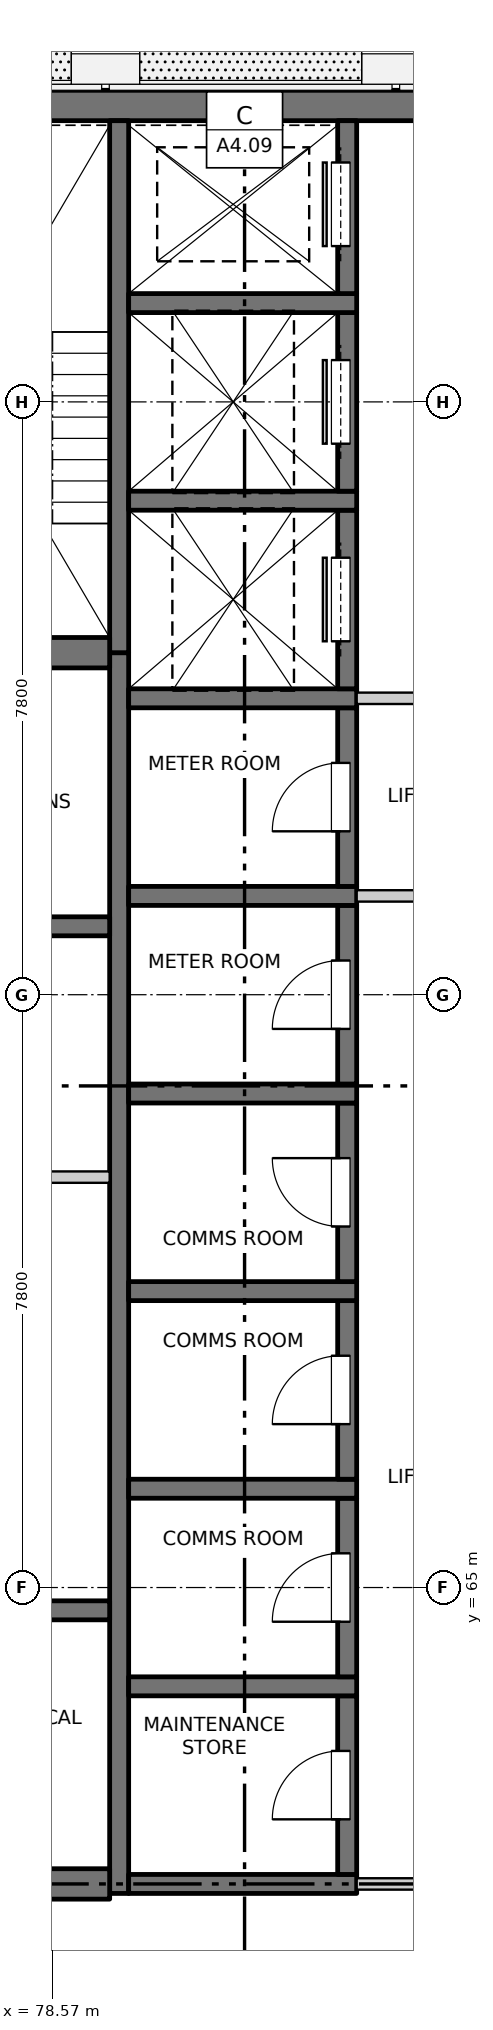
"""IFC4 building model, lengths in metres.
Left out: names, types, materials, properties, quantities, classifications, styles, units other than length and angle.
Written with IfcOpenShell. Run it as: python <this file> out.ifc"""

import sys

from ifc_helpers import new_model, si_unit, direction, frame, frame_2d, origin, place, context, subcontext, project, spatial, rectangle, extrude, element, fill, save


model = new_model("IFC4")
c1 = context("Model", 3, precision=1e-05, world=origin(), true_north=direction((0.0, 1.0)))
c2 = subcontext(c1, "Body", "Model", "MODEL_VIEW")
j1 = project(units=[si_unit("LENGTHUNIT", "METRE"), si_unit("PLANEANGLEUNIT", "RADIAN")], contexts=[c1])
p1 = place(None, origin())
s1 = spatial("IfcSite", under=j1, at=p1, CompositionType="ELEMENT")
p2 = place(p1, origin())
s2 = spatial("IfcBuilding", under=s1, at=p2, CompositionType="ELEMENT")
p3 = place(p2, frame((0.0, 0.0, 249.4)))
s3 = spatial("IfcBuildingStorey", under=s2, at=p3, CompositionType="ELEMENT", Elevation=249.4)
p4 = place(p3, frame((75.45, 84.5, -0.25), z_axis=(0.0, 0.0, 1.0), x_axis=(1.0, 0.0, 0.0)))
e1 = element("IfcWall", 1, at=p4, inside=s3, PredefinedType="SOLIDWALL", context=c2, shape_type="SweptSolid", body=[
    extrude(rectangle(XDim=19.1, YDim=0.4, at=frame_2d((9.55, 0.0))), origin(), (0.0, 0.0, 1.0), 3.4),
])
p5 = place(p3, frame((79.45, 60.975, -0.25), z_axis=(0.0, 0.0, 1.0), x_axis=(0.0, 1.0, 0.0)))
e2 = element("IfcWall", 2, at=p5, inside=s3, PredefinedType="SOLIDWALL", context=c2, shape_type="SweptSolid", body=[
    extrude(rectangle(XDim=16.325, YDim=0.25, at=frame_2d((8.163, 0.0))), origin(), (0.0, 0.0, 1.0), 3.4),
])
p6 = place(p3, frame((79.45, 77.3, -0.25), z_axis=(0.0, 0.0, 1.0), x_axis=(0.0, 1.0, 0.0)))
e3 = element("IfcWall", 3, at=p6, inside=s3, PredefinedType="SOLIDWALL", context=c2, shape_type="SweptSolid", body=[
    extrude(rectangle(XDim=7.0, YDim=0.25, at=frame_2d((3.5, 0.0))), origin(), (0.0, 0.0, 1.0), 3.4),
])
p7 = place(p3, frame((79.575, 61.1, -0.25), z_axis=(0.0, 0.0, 1.0), x_axis=(1.0, 0.0, 0.0)))
e4 = element("IfcWall", 4, at=p7, inside=s3, PredefinedType="SOLIDWALL", context=c2, shape_type="SweptSolid", body=[
    extrude(rectangle(XDim=3.0, YDim=0.25, at=frame_2d((1.5, 0.0))), origin(), (0.0, 0.0, 1.0), 3.4),
])
p8 = place(p3, frame((82.45, 61.225, -0.25), z_axis=(0.0, 0.0, 1.0), x_axis=(0.0, 1.0, 0.0)))
e5 = element("IfcWall", 5, at=p8, inside=s3, PredefinedType="SOLIDWALL", context=c2, shape_type="SweptSolid", body=[
    extrude(rectangle(XDim=2.35, YDim=0.25, at=frame_2d((1.175, 0.0))), origin(), (0.0, 0.0, 1.0), 3.4),
])
p9 = place(p8, frame((0.725, 0.0, 0.25)))
e6 = element("IfcOpeningElement", 6, at=p9, cuts=e5, PredefinedType="OPENING", context=c2, shape_type="SweptSolid", body=[
    extrude(rectangle(XDim=0.9, YDim=2.1, at=frame_2d((0.45, 1.05))), frame((0.0, 0.135, 0.0), z_axis=(0.0, -1.0, 0.0), x_axis=(1.0, 0.0, 0.0)), (0.0, 0.0, 1.0), 0.27),
])
p10 = place(p3, frame((79.575, 63.7, -0.25), z_axis=(0.0, 0.0, 1.0), x_axis=(1.0, 0.0, 0.0)))
e7 = element("IfcWall", 7, at=p10, inside=s3, PredefinedType="SOLIDWALL", context=c2, shape_type="SweptSolid", body=[
    extrude(rectangle(XDim=3.0, YDim=0.25, at=frame_2d((1.5, 0.0))), origin(), (0.0, 0.0, 1.0), 3.4),
])
p11 = place(p3, frame((82.45, 63.825, -0.25), z_axis=(0.0, 0.0, 1.0), x_axis=(0.0, 1.0, 0.0)))
e8 = element("IfcWall", 8, at=p11, inside=s3, PredefinedType="SOLIDWALL", context=c2, shape_type="SweptSolid", body=[
    extrude(rectangle(XDim=2.35, YDim=0.25, at=frame_2d((1.175, 0.0))), origin(), (0.0, 0.0, 1.0), 3.4),
])
p12 = place(p11, frame((0.725, 0.0, 0.25)))
e9 = element("IfcOpeningElement", 9, at=p12, cuts=e8, PredefinedType="OPENING", context=c2, shape_type="SweptSolid", body=[
    extrude(rectangle(XDim=0.9, YDim=2.1, at=frame_2d((0.45, 1.05))), frame((0.0, 0.135, 0.0), z_axis=(0.0, -1.0, 0.0), x_axis=(1.0, 0.0, 0.0)), (0.0, 0.0, 1.0), 0.27),
])
p13 = place(p3, frame((79.575, 66.3, -0.25), z_axis=(0.0, 0.0, 1.0), x_axis=(1.0, 0.0, 0.0)))
e10 = element("IfcWall", 10, at=p13, inside=s3, PredefinedType="SOLIDWALL", context=c2, shape_type="SweptSolid", body=[
    extrude(rectangle(XDim=3.0, YDim=0.25, at=frame_2d((1.5, 0.0))), origin(), (0.0, 0.0, 1.0), 3.4),
])
p14 = place(p3, frame((82.45, 66.425, -0.25), z_axis=(0.0, 0.0, 1.0), x_axis=(0.0, 1.0, 0.0)))
e11 = element("IfcWall", 11, at=p14, inside=s3, PredefinedType="SOLIDWALL", context=c2, shape_type="SweptSolid", body=[
    extrude(rectangle(XDim=2.35, YDim=0.25, at=frame_2d((1.175, 0.0))), origin(), (0.0, 0.0, 1.0), 3.4),
])
p15 = place(p14, frame((0.725, 0.0, 0.25)))
e12 = element("IfcOpeningElement", 12, at=p15, cuts=e11, PredefinedType="OPENING", context=c2, shape_type="SweptSolid", body=[
    extrude(rectangle(XDim=0.9, YDim=2.1, at=frame_2d((0.45, 1.05))), frame((0.0, 0.135, 0.0), z_axis=(0.0, -1.0, 0.0), x_axis=(1.0, 0.0, 0.0)), (0.0, 0.0, 1.0), 0.27),
])
p16 = place(p3, frame((79.575, 68.9, -0.25), z_axis=(0.0, 0.0, 1.0), x_axis=(1.0, 0.0, 0.0)))
e13 = element("IfcWall", 13, at=p16, inside=s3, PredefinedType="SOLIDWALL", context=c2, shape_type="SweptSolid", body=[
    extrude(rectangle(XDim=3.0, YDim=0.25, at=frame_2d((1.5, 0.0))), origin(), (0.0, 0.0, 1.0), 3.4),
])
p17 = place(p3, frame((82.45, 69.025, -0.25), z_axis=(0.0, 0.0, 1.0), x_axis=(0.0, 1.0, 0.0)))
e14 = element("IfcWall", 14, at=p17, inside=s3, PredefinedType="SOLIDWALL", context=c2, shape_type="SweptSolid", body=[
    extrude(rectangle(XDim=2.35, YDim=0.25, at=frame_2d((1.175, 0.0))), origin(), (0.0, 0.0, 1.0), 3.4),
])
p18 = place(p17, frame((0.725, 0.0, 0.25)))
e15 = element("IfcOpeningElement", 15, at=p18, cuts=e14, PredefinedType="OPENING", context=c2, shape_type="SweptSolid", body=[
    extrude(rectangle(XDim=0.9, YDim=2.1, at=frame_2d((0.45, 1.05))), frame((0.0, 0.135, 0.0), z_axis=(0.0, -1.0, 0.0), x_axis=(1.0, 0.0, 0.0)), (0.0, 0.0, 1.0), 0.27),
])
p19 = place(p3, frame((79.575, 71.5, -0.25), z_axis=(0.0, 0.0, 1.0), x_axis=(1.0, 0.0, 0.0)))
e16 = element("IfcWall", 16, at=p19, inside=s3, PredefinedType="SOLIDWALL", context=c2, shape_type="SweptSolid", body=[
    extrude(rectangle(XDim=3.0, YDim=0.25, at=frame_2d((1.5, 0.0))), origin(), (0.0, 0.0, 1.0), 3.4),
])
p20 = place(p3, frame((82.45, 71.625, -0.25), z_axis=(0.0, 0.0, 1.0), x_axis=(0.0, 1.0, 0.0)))
e17 = element("IfcWall", 17, at=p20, inside=s3, PredefinedType="SOLIDWALL", context=c2, shape_type="SweptSolid", body=[
    extrude(rectangle(XDim=2.35, YDim=0.25, at=frame_2d((1.175, 0.0))), origin(), (0.0, 0.0, 1.0), 3.4),
])
p21 = place(p20, frame((0.725, 0.0, 0.25)))
e18 = element("IfcOpeningElement", 18, at=p21, cuts=e17, PredefinedType="OPENING", context=c2, shape_type="SweptSolid", body=[
    extrude(rectangle(XDim=0.9, YDim=2.1, at=frame_2d((0.45, 1.05))), frame((0.0, 0.135, 0.0), z_axis=(0.0, -1.0, 0.0), x_axis=(1.0, 0.0, 0.0)), (0.0, 0.0, 1.0), 0.27),
])
p22 = place(p3, frame((79.575, 74.1, -0.25), z_axis=(0.0, 0.0, 1.0), x_axis=(1.0, 0.0, 0.0)))
e19 = element("IfcWall", 19, at=p22, inside=s3, PredefinedType="SOLIDWALL", context=c2, shape_type="SweptSolid", body=[
    extrude(rectangle(XDim=3.0, YDim=0.25, at=frame_2d((1.5, 0.0))), origin(), (0.0, 0.0, 1.0), 3.4),
])
p23 = place(p3, frame((82.45, 74.225, -0.25), z_axis=(0.0, 0.0, 1.0), x_axis=(0.0, 1.0, 0.0)))
e20 = element("IfcWall", 20, at=p23, inside=s3, PredefinedType="SOLIDWALL", context=c2, shape_type="SweptSolid", body=[
    extrude(rectangle(XDim=2.35, YDim=0.25, at=frame_2d((1.175, 0.0))), origin(), (0.0, 0.0, 1.0), 3.4),
])
p24 = place(p23, frame((0.725, 0.0, 0.25)))
e21 = element("IfcOpeningElement", 21, at=p24, cuts=e20, PredefinedType="OPENING", context=c2, shape_type="SweptSolid", body=[
    extrude(rectangle(XDim=0.9, YDim=2.1, at=frame_2d((0.45, 1.05))), frame((0.0, 0.135, 0.0), z_axis=(0.0, -1.0, 0.0), x_axis=(1.0, 0.0, 0.0)), (0.0, 0.0, 1.0), 0.27),
])
p25 = place(p3, frame((79.575, 76.7, -0.25), z_axis=(0.0, 0.0, 1.0), x_axis=(1.0, 0.0, 0.0)))
e22 = element("IfcWall", 22, at=p25, inside=s3, PredefinedType="SOLIDWALL", context=c2, shape_type="SweptSolid", body=[
    extrude(rectangle(XDim=3.0, YDim=0.25, at=frame_2d((1.5, 0.0))), origin(), (0.0, 0.0, 1.0), 3.4),
])
p26 = place(p3, frame((82.45, 76.825, -0.25), z_axis=(0.0, 0.0, 1.0), x_axis=(0.0, 1.0, 0.0)))
e23 = element("IfcWall", 23, at=p26, inside=s3, PredefinedType="SOLIDWALL", context=c2, shape_type="SweptSolid", body=[
    extrude(rectangle(XDim=2.35, YDim=0.25, at=frame_2d((1.175, 0.0))), origin(), (0.0, 0.0, 1.0), 3.4),
])
p27 = place(p26, frame((0.625, 0.0, 0.25)))
e24 = element("IfcOpeningElement", 24, at=p27, cuts=e23, PredefinedType="OPENING", context=c2, shape_type="SweptSolid", body=[
    extrude(rectangle(XDim=1.1, YDim=2.1, at=frame_2d((0.55, 1.05))), frame((0.0, 0.135, 0.0), z_axis=(0.0, -1.0, 0.0), x_axis=(1.0, 0.0, 0.0)), (0.0, 0.0, 1.0), 0.27),
])
p28 = place(p3, frame((79.575, 79.3, -0.25), z_axis=(0.0, 0.0, 1.0), x_axis=(1.0, 0.0, 0.0)))
e25 = element("IfcWall", 25, at=p28, inside=s3, PredefinedType="SOLIDWALL", context=c2, shape_type="SweptSolid", body=[
    extrude(rectangle(XDim=3.0, YDim=0.25, at=frame_2d((1.5, 0.0))), origin(), (0.0, 0.0, 1.0), 3.4),
])
p29 = place(p3, frame((82.45, 79.425, -0.25), z_axis=(0.0, 0.0, 1.0), x_axis=(0.0, 1.0, 0.0)))
e26 = element("IfcWall", 26, at=p29, inside=s3, PredefinedType="SOLIDWALL", context=c2, shape_type="SweptSolid", body=[
    extrude(rectangle(XDim=2.35, YDim=0.25, at=frame_2d((1.175, 0.0))), origin(), (0.0, 0.0, 1.0), 3.4),
])
p30 = place(p29, frame((0.625, 0.0, 0.25)))
e27 = element("IfcOpeningElement", 27, at=p30, cuts=e26, PredefinedType="OPENING", context=c2, shape_type="SweptSolid", body=[
    extrude(rectangle(XDim=1.1, YDim=2.1, at=frame_2d((0.55, 1.05))), frame((0.0, 0.135, 0.0), z_axis=(0.0, -1.0, 0.0), x_axis=(1.0, 0.0, 0.0)), (0.0, 0.0, 1.0), 0.27),
])
p31 = place(p3, frame((79.575, 81.9, -0.25), z_axis=(0.0, 0.0, 1.0), x_axis=(1.0, 0.0, 0.0)))
e28 = element("IfcWall", 28, at=p31, inside=s3, PredefinedType="SOLIDWALL", context=c2, shape_type="SweptSolid", body=[
    extrude(rectangle(XDim=3.0, YDim=0.25, at=frame_2d((1.5, 0.0))), origin(), (0.0, 0.0, 1.0), 3.4),
])
p32 = place(p3, frame((82.45, 82.025, -0.25), z_axis=(0.0, 0.0, 1.0), x_axis=(0.0, 1.0, 0.0)))
e29 = element("IfcWall", 29, at=p32, inside=s3, PredefinedType="SOLIDWALL", context=c2, shape_type="SweptSolid", body=[
    extrude(rectangle(XDim=2.275, YDim=0.25, at=frame_2d((1.138, 0.0))), origin(), (0.0, 0.0, 1.0), 3.4),
])
p33 = place(p32, frame((0.625, 0.0, 0.25)))
e30 = element("IfcOpeningElement", 30, at=p33, cuts=e29, PredefinedType="OPENING", context=c2, shape_type="SweptSolid", body=[
    extrude(rectangle(XDim=1.1, YDim=2.1, at=frame_2d((0.55, 1.05))), frame((0.0, 0.135, 0.0), z_axis=(0.0, -1.0, 0.0), x_axis=(1.0, 0.0, 0.0)), (0.0, 0.0, 1.0), 0.27),
])
p34 = place(p3, frame((75.45, 61.1, -0.25), z_axis=(0.0, 0.0, 1.0), x_axis=(1.0, 0.0, 0.0)))
e31 = element("IfcWall", 31, at=p34, inside=s3, PredefinedType="SOLIDWALL", context=c2, shape_type="SweptSolid", body=[
    extrude(rectangle(XDim=3.875, YDim=0.4, at=frame_2d((1.938, 0.0))), origin(), (0.0, 0.0, 1.0), 3.4),
])
for number, where, z_axis, x_axis in (
    (32, (75.45, 64.7, -0.25), (0.0, 0.0, 1.0), (1.0, 0.0, 0.0)),
    (33, (75.45, 73.7, -0.25), (0.0, 0.0, 1.0), (1.0, 0.0, 0.0)),
):
    element("IfcWall", number, at=place(p3, frame(where, z_axis=z_axis, x_axis=x_axis)), inside=s3, PredefinedType="SOLIDWALL", context=c2, shape_type="SweptSolid", body=[
        extrude(rectangle(XDim=3.875, YDim=0.25, at=frame_2d((1.938, 0.0))), origin(), (0.0, 0.0, 1.0), 3.4),
    ])
p35 = place(p3, frame((75.45, 77.3, -0.25), z_axis=(0.0, 0.0, 1.0), x_axis=(1.0, 0.0, 0.0)))
e34 = element("IfcWall", 34, at=p35, inside=s3, PredefinedType="SOLIDWALL", context=c2, shape_type="SweptSolid", body=[
    extrude(rectangle(XDim=3.875, YDim=0.4, at=frame_2d((1.938, 0.0))), origin(), (0.0, 0.0, 1.0), 3.4),
])
p36 = place(p3, frame((82.575, 61.1, 0.0), z_axis=(0.0, 0.0, 1.0), x_axis=(1.0, 0.0, 0.0)))
e35 = element("IfcWall", 35, at=p36, inside=s3, PredefinedType="PARTITIONING", context=c2, shape_type="SweptSolid", body=[
    extrude(rectangle(XDim=4.85, YDim=0.15, at=frame_2d((2.425, 0.0))), origin(), (0.0, 0.0, 1.0), 3.15),
])
p37 = place(p36, frame((1.525, 0.0, 0.0)))
e36 = element("IfcOpeningElement", 36, at=p37, cuts=e35, PredefinedType="OPENING", context=c2, shape_type="SweptSolid", body=[
    extrude(rectangle(XDim=1.8, YDim=2.1, at=frame_2d((0.9, 1.05))), frame((0.0, 0.085, 0.0), z_axis=(0.0, -1.0, 0.0), x_axis=(1.0, 0.0, 0.0)), (0.0, 0.0, 1.0), 0.17),
])
p38 = place(p3, frame((75.45, 70.4, 0.0), z_axis=(0.0, 0.0, 1.0), x_axis=(1.0, 0.0, 0.0)))
e37 = element("IfcWall", 37, at=p38, inside=s3, PredefinedType="PARTITIONING", context=c2, shape_type="SweptSolid", body=[
    extrude(rectangle(XDim=3.875, YDim=0.15, at=frame_2d((1.938, 0.0))), origin(), (0.0, 0.0, 1.0), 3.15),
])
p39 = place(p3, frame((82.575, 74.1, 0.0), z_axis=(0.0, 0.0, 1.0), x_axis=(1.0, 0.0, 0.0)))
e38 = element("IfcWall", 38, at=p39, inside=s3, PredefinedType="PARTITIONING", context=c2, shape_type="SweptSolid", body=[
    extrude(rectangle(XDim=4.85, YDim=0.15, at=frame_2d((2.425, 0.0))), origin(), (0.0, 0.0, 1.0), 3.15),
])
p40 = place(p39, frame((1.525, 0.0, 0.0)))
e39 = element("IfcOpeningElement", 39, at=p40, cuts=e38, PredefinedType="OPENING", context=c2, shape_type="SweptSolid", body=[
    extrude(rectangle(XDim=1.8, YDim=2.1, at=frame_2d((0.9, 1.05))), frame((0.0, 0.085, 0.0), z_axis=(0.0, -1.0, 0.0), x_axis=(1.0, 0.0, 0.0)), (0.0, 0.0, 1.0), 0.17),
])
p41 = place(p3, frame((82.575, 76.7, 0.0), z_axis=(0.0, 0.0, 1.0), x_axis=(1.0, 0.0, 0.0)))
e40 = element("IfcWall", 40, at=p41, inside=s3, PredefinedType="PARTITIONING", context=c2, shape_type="SweptSolid", body=[
    extrude(rectangle(XDim=4.85, YDim=0.15, at=frame_2d((2.425, 0.0))), origin(), (0.0, 0.0, 1.0), 3.15),
])
p42 = place(p41, frame((1.525, 0.0, 0.0)))
e41 = element("IfcOpeningElement", 41, at=p42, cuts=e40, PredefinedType="OPENING", context=c2, shape_type="SweptSolid", body=[
    extrude(rectangle(XDim=1.8, YDim=2.1, at=frame_2d((0.9, 1.05))), frame((0.0, 0.085, 0.0), z_axis=(0.0, -1.0, 0.0), x_axis=(1.0, 0.0, 0.0)), (0.0, 0.0, 1.0), 0.17),
])
p43 = place(p9, origin())
e42 = element("IfcDoor", 42, at=p43, inside=s3, OperationType="SINGLE_SWING_LEFT", PredefinedType="DOOR", context=c2, shape_type="SweptSolid", body=[
    extrude(rectangle(XDim=0.9, YDim=2.1, at=frame_2d((0.45, 1.05))), frame((0.0, 0.11, 0.0), z_axis=(0.0, -1.0, 0.0), x_axis=(1.0, 0.0, 0.0)), (0.0, 0.0, 1.0), 0.05),
])
fill(e6, e42)
p44 = place(p12, origin())
e43 = element("IfcDoor", 43, at=p44, inside=s3, OperationType="SINGLE_SWING_LEFT", PredefinedType="DOOR", context=c2, shape_type="SweptSolid", body=[
    extrude(rectangle(XDim=0.9, YDim=2.1, at=frame_2d((0.45, 1.05))), frame((0.0, 0.11, 0.0), z_axis=(0.0, -1.0, 0.0), x_axis=(1.0, 0.0, 0.0)), (0.0, 0.0, 1.0), 0.05),
])
fill(e9, e43)
p45 = place(p15, origin())
e44 = element("IfcDoor", 44, at=p45, inside=s3, OperationType="SINGLE_SWING_LEFT", PredefinedType="DOOR", context=c2, shape_type="SweptSolid", body=[
    extrude(rectangle(XDim=0.9, YDim=2.1, at=frame_2d((0.45, 1.05))), frame((0.0, 0.11, 0.0), z_axis=(0.0, -1.0, 0.0), x_axis=(1.0, 0.0, 0.0)), (0.0, 0.0, 1.0), 0.05),
])
fill(e12, e44)
p46 = place(p18, origin())
e45 = element("IfcDoor", 45, at=p46, inside=s3, OperationType="SINGLE_SWING_RIGHT", PredefinedType="DOOR", context=c2, shape_type="SweptSolid", body=[
    extrude(rectangle(XDim=0.9, YDim=2.1, at=frame_2d((0.45, 1.05))), frame((0.0, 0.11, 0.0), z_axis=(0.0, -1.0, 0.0), x_axis=(1.0, 0.0, 0.0)), (0.0, 0.0, 1.0), 0.05),
])
fill(e15, e45)
p47 = place(p21, origin())
e46 = element("IfcDoor", 46, at=p47, inside=s3, OperationType="SINGLE_SWING_LEFT", PredefinedType="DOOR", context=c2, shape_type="SweptSolid", body=[
    extrude(rectangle(XDim=0.9, YDim=2.1, at=frame_2d((0.45, 1.05))), frame((0.0, 0.11, 0.0), z_axis=(0.0, -1.0, 0.0), x_axis=(1.0, 0.0, 0.0)), (0.0, 0.0, 1.0), 0.05),
])
fill(e18, e46)
p48 = place(p24, origin())
e47 = element("IfcDoor", 47, at=p48, inside=s3, OperationType="SINGLE_SWING_LEFT", PredefinedType="DOOR", context=c2, shape_type="SweptSolid", body=[
    extrude(rectangle(XDim=0.9, YDim=2.1, at=frame_2d((0.45, 1.05))), frame((0.0, 0.11, 0.0), z_axis=(0.0, -1.0, 0.0), x_axis=(1.0, 0.0, 0.0)), (0.0, 0.0, 1.0), 0.05),
])
fill(e21, e47)
p49 = place(p27, origin())
e48 = element("IfcDoor", 48, at=p49, inside=s3, OperationType="SLIDING_TO_LEFT", PredefinedType="DOOR", context=c2, shape_type="SweptSolid", body=[
    extrude(rectangle(XDim=1.1, YDim=2.1, at=frame_2d((0.55, 1.05))), frame((0.0, 0.11, 0.0), z_axis=(0.0, -1.0, 0.0), x_axis=(1.0, 0.0, 0.0)), (0.0, 0.0, 1.0), 0.05),
])
fill(e24, e48)
p50 = place(p30, origin())
e49 = element("IfcDoor", 49, at=p50, inside=s3, OperationType="SLIDING_TO_LEFT", PredefinedType="DOOR", context=c2, shape_type="SweptSolid", body=[
    extrude(rectangle(XDim=1.1, YDim=2.1, at=frame_2d((0.55, 1.05))), frame((0.0, 0.11, 0.0), z_axis=(0.0, -1.0, 0.0), x_axis=(1.0, 0.0, 0.0)), (0.0, 0.0, 1.0), 0.05),
])
fill(e27, e49)
p51 = place(p33, origin())
e50 = element("IfcDoor", 50, at=p51, inside=s3, OperationType="SLIDING_TO_RIGHT", PredefinedType="DOOR", context=c2, shape_type="SweptSolid", body=[
    extrude(rectangle(XDim=1.1, YDim=2.1, at=frame_2d((0.55, 1.05))), frame((0.0, 0.11, 0.0), z_axis=(0.0, -1.0, 0.0), x_axis=(1.0, 0.0, 0.0)), (0.0, 0.0, 1.0), 0.05),
])
fill(e30, e50)
save(model, sys.argv[1])
